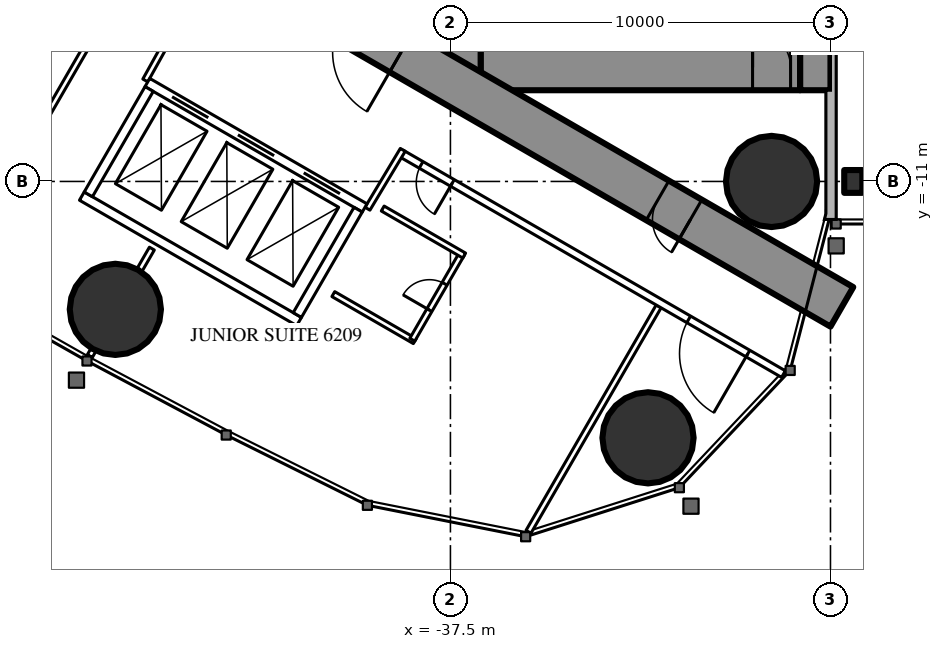
"""IFC4 building model, lengths in metres.
Left out: names, types, materials, properties, quantities, classifications, styles, units other than length and angle.
Written with IfcOpenShell. Run it as: python <this file> out.ifc"""

import sys

from ifc_helpers import new_model, si_unit, direction, frame, frame_2d, origin, origin_2d, place, context, subcontext, project, spatial, rectangle, circle, i_section, extrude, element, fill, save


model = new_model("IFC4")
c1 = context("Model", 3, precision=1e-05, world=origin(), true_north=direction((0.0, 1.0)))
c2 = subcontext(c1, "Body", "Model", "MODEL_VIEW")
j1 = project(units=[si_unit("LENGTHUNIT", "METRE"), si_unit("PLANEANGLEUNIT", "RADIAN")], contexts=[c1])
p1 = place(None, origin())
s1 = spatial("IfcSite", under=j1, at=p1, CompositionType="ELEMENT")
p2 = place(p1, origin())
s2 = spatial("IfcBuilding", under=s1, at=p2, CompositionType="ELEMENT")
p3 = place(p2, frame((0.0, 0.0, 233.3)))
s3 = spatial("IfcBuildingStorey", under=s2, at=p3, CompositionType="ELEMENT", Elevation=233.3)
for number, where, z_axis, x_axis in (
    (1, (-32.301, -17.745, 0.0), (0.0, 0.0, 1.0), (1.0, 0.0, 0.0)),
    (2, (-29.05, -11.0, 0.0), (0.0, 0.0, 1.0), (1.0, 0.0, 0.0)),
    (3, (-46.317, -14.365, 0.0), (0.0, 0.0, 1.0), (1.0, 0.0, 0.0)),
):
    element("IfcColumn", number, at=place(p3, frame(where, z_axis=z_axis, x_axis=x_axis)), inside=s3, PredefinedType="COLUMN", context=c2, shape_type="SweptSolid", body=[
        extrude(circle(Radius=1.2, at=origin_2d()), origin(), (0.0, 0.0, 1.0), 3.6),
    ])
p4 = place(p3, frame((-27.9, 8.6, 0.0), z_axis=(0.0, 0.0, 1.0), x_axis=(0.0, -1.0, 0.0)))
e4 = element("IfcWall", 4, at=p4, inside=s3, PredefinedType="SHEAR", context=c2, shape_type="SweptSolid", body=[
    extrude(rectangle(XDim=17.2, YDim=0.8, at=frame_2d((8.6, 0.0))), origin(), (0.0, 0.0, 1.0), 3.6),
])
p5 = place(p4, frame((6.95, 0.0, 0.0)))
e5 = element("IfcOpeningElement", 5, at=p5, cuts=e4, PredefinedType="OPENING", context=c2, shape_type="SweptSolid", body=[
    extrude(rectangle(XDim=0.9, YDim=2.2, at=frame_2d((0.45, 1.1))), frame((0.0, 0.41, 0.0), z_axis=(0.0, -1.0, 0.0), x_axis=(1.0, 0.0, 0.0)), (0.0, 0.0, 1.0), 0.82),
])
p6 = place(p3, frame((-37.3, 8.6, 0.0), z_axis=(0.0, 0.0, 1.0), x_axis=(0.0, -1.0, 0.0)))
e6 = element("IfcWall", 6, at=p6, inside=s3, PredefinedType="SHEAR", context=c2, shape_type="SweptSolid", body=[
    extrude(rectangle(XDim=17.2, YDim=1.2, at=frame_2d((8.6, 0.0))), origin(), (0.0, 0.0, 1.0), 3.6),
])
p7 = place(p6, frame((7.7, 0.0, 0.0)))
e7 = element("IfcOpeningElement", 7, at=p7, cuts=e6, PredefinedType="OPENING", context=c2, shape_type="SweptSolid", body=[
    extrude(rectangle(XDim=1.8, YDim=2.2, at=frame_2d((0.9, 1.1))), frame((0.0, 0.61, 0.0), z_axis=(0.0, -1.0, 0.0), x_axis=(1.0, 0.0, 0.0)), (0.0, 0.0, 1.0), 1.22),
])
p8 = place(p3, frame((-28.3, -8.0, 0.0), z_axis=(0.0, 0.0, 1.0), x_axis=(-1.0, 0.0, 0.0)))
e8 = element("IfcWall", 8, at=p8, inside=s3, PredefinedType="SHEAR", context=c2, shape_type="SweptSolid", body=[
    extrude(rectangle(XDim=8.4, YDim=1.2, at=frame_2d((4.2, 0.0))), origin(), (0.0, 0.0, 1.0), 3.6),
])
p9 = place(p8, frame((0.25, 0.0, 0.0)))
e9 = element("IfcOpeningElement", 9, at=p9, cuts=e8, PredefinedType="OPENING", context=c2, shape_type="SweptSolid", body=[
    extrude(rectangle(XDim=1.0, YDim=2.2, at=frame_2d((0.5, 1.1))), frame((0.0, 0.61, 0.0), z_axis=(0.0, -1.0, 0.0), x_axis=(1.0, 0.0, 0.0)), (0.0, 0.0, 1.0), 1.22),
])
p10 = place(p3, frame((-27.2, -14.3, 0.0), z_axis=(0.0, 0.0, 1.0), x_axis=(-0.866024021859, 0.500002393557, 0.0)))
e10 = element("IfcWall", 10, at=p10, inside=s3, PredefinedType="SHEAR", context=c2, shape_type="SweptSolid", body=[
    extrude(rectangle(XDim=27.907, YDim=1.2, at=frame_2d((13.954, 0.0))), origin(), (0.0, 0.0, 1.0), 3.6),
])
p11 = place(p10, frame((4.6, 0.0, 0.0)))
e11 = element("IfcOpeningElement", 11, at=p11, cuts=e10, PredefinedType="OPENING", context=c2, shape_type="SweptSolid", body=[
    extrude(rectangle(XDim=1.0, YDim=2.2, at=frame_2d((0.5, 1.1))), frame((0.0, 0.61, 0.0), z_axis=(0.0, -1.0, 0.0), x_axis=(1.0, 0.0, 0.0)), (0.0, 0.0, 1.0), 1.22),
])
p12 = place(p10, frame((13.395, 0.0, 0.0)))
e12 = element("IfcOpeningElement", 12, at=p12, cuts=e10, PredefinedType="OPENING", context=c2, shape_type="SweptSolid", body=[
    extrude(rectangle(XDim=1.8, YDim=2.2, at=frame_2d((0.9, 1.1))), frame((0.0, 0.61, 0.0), z_axis=(0.0, -1.0, 0.0), x_axis=(1.0, 0.0, 0.0)), (0.0, 0.0, 1.0), 1.22),
])
p13 = place(p3, frame((-26.9, -11.0, 0.0), z_axis=(0.0, 0.0, 1.0), x_axis=(1.0, 0.0, 0.0)))
e13 = element("IfcColumn", 13, at=p13, inside=s3, PredefinedType="COLUMN", context=c2, shape_type="SweptSolid", body=[
    extrude(i_section(OverallWidth=0.476, OverallDepth=0.6, WebThickness=0.1, FlangeThickness=0.14, FilletRadius=0.02, at=origin_2d()), origin(), (0.0, 0.0, 1.0), 3.6),
])
p14 = place(p3, frame((-32.022, -14.287, 0.0), z_axis=(0.0, 0.0, 1.0), x_axis=(-0.50000019414, -0.866025291697, 0.0)))
e14 = element("IfcWall", 14, at=p14, inside=s3, PredefinedType="PARTITIONING", context=c2, shape_type="SweptSolid", body=[
    extrude(rectangle(XDim=6.848, YDim=0.15, at=frame_2d((3.424, 0.0))), origin(), (0.0, 0.0, 1.0), 3.35),
])
p15 = place(p3, frame((-46.898, -15.439, 0.0), z_axis=(0.0, 0.0, 1.0), x_axis=(-0.500232303069, -0.865891241997, 0.0)))
e15 = element("IfcWall", 15, at=p15, inside=s3, PredefinedType="PARTITIONING", context=c2, shape_type="SweptSolid", body=[
    extrude(rectangle(XDim=0.18, YDim=0.15, at=frame_2d((0.09, 0.0))), origin(), (0.0, 0.0, 1.0), 2.45),
])
p16 = place(p3, frame((-46.274, -6.059, 0.0), z_axis=(0.0, 0.0, 1.0), x_axis=(-0.500020471368, -0.866013584312, 0.0)))
e16 = element("IfcWall", 16, at=p16, inside=s3, PredefinedType="PARTITIONING", context=c2, shape_type="SweptSolid", body=[
    extrude(rectangle(XDim=6.028, YDim=0.15, at=frame_2d((3.014, 0.0))), origin(), (0.0, 0.0, 1.0), 2.45),
])
p17 = place(p3, frame((-45.356, -12.767, 0.0), z_axis=(0.0, 0.0, 1.0), x_axis=(-0.499886366516, -0.866091000168, 0.0)))
e17 = element("IfcWall", 17, at=p17, inside=s3, PredefinedType="PARTITIONING", context=c2, shape_type="SweptSolid", body=[
    extrude(rectangle(XDim=0.645, YDim=0.15, at=frame_2d((0.322, 0.0))), origin(), (0.0, 0.0, 1.0), 3.35),
])
p18 = place(p3, frame((-28.737, -16.068, 0.0), z_axis=(0.0, 0.0, 1.0), x_axis=(-0.866029399323, 0.49999307946, 0.0)))
e18 = element("IfcWall", 18, at=p18, inside=s3, PredefinedType="PARTITIONING", context=c2, shape_type="SweptSolid", body=[
    extrude(rectangle(XDim=11.61, YDim=0.2, at=frame_2d((5.805, 0.0))), origin(), (0.0, 0.0, 1.0), 3.35),
])
p19 = place(p18, frame((1.08, 0.0, 0.0)))
e19 = element("IfcOpeningElement", 19, at=p19, cuts=e18, PredefinedType="OPENING", context=c2, shape_type="SweptSolid", body=[
    extrude(rectangle(XDim=1.8, YDim=2.03, at=frame_2d((0.9, 1.015))), frame((0.0, 0.11, 0.0), z_axis=(0.0, -1.0, 0.0), x_axis=(1.0, 0.0, 0.0)), (0.0, 0.0, 1.0), 0.22),
])
p20 = place(p18, frame((10.06, 0.0, 0.0)))
e20 = element("IfcOpeningElement", 20, at=p20, cuts=e18, PredefinedType="OPENING", context=c2, shape_type="SweptSolid", body=[
    extrude(rectangle(XDim=0.95, YDim=2.2, at=frame_2d((0.475, 1.1))), frame((0.0, 0.11, 0.0), z_axis=(0.0, -1.0, 0.0), x_axis=(1.0, 0.0, 0.0)), (0.0, 0.0, 1.0), 0.22),
])
for number, where, z_axis, x_axis in (
    (21, (-39.683, -11.718, 0.0), (0.0, 0.0, 1.0), (0.514, 0.858, 0.0)),
    (22, (-44.652, -6.764, 0.0), (0.0, 0.0, 1.0), (-0.485, -0.874, 0.0)),
):
    element("IfcWall", number, at=place(p3, frame(where, z_axis=z_axis, x_axis=x_axis)), inside=s3, PredefinedType="PARTITIONING", context=c2, shape_type="SweptSolid", body=[
        extrude(rectangle(XDim=1.805, YDim=0.15, at=frame_2d((0.903, 0.0))), origin(), (0.0, 0.0, 1.0), 3.35),
    ])
p21 = place(p3, frame((-38.438, -15.202, 0.0), z_axis=(0.0, 0.0, 1.0), x_axis=(-0.866073894602, 0.499916002032, 0.0)))
e23 = element("IfcWall", 23, at=p21, inside=s3, PredefinedType="PARTITIONING", context=c2, shape_type="SweptSolid", body=[
    extrude(rectangle(XDim=2.475, YDim=0.15, at=frame_2d((1.238, 0.0))), origin(), (0.0, 0.0, 1.0), 3.35),
])
p22 = place(p3, frame((-37.203, -12.913, 0.0), z_axis=(0.0, 0.0, 1.0), x_axis=(-0.500006934395, -0.866021400173, 0.0)))
e24 = element("IfcWall", 24, at=p22, inside=s3, PredefinedType="PARTITIONING", context=c2, shape_type="SweptSolid", body=[
    extrude(rectangle(XDim=2.6, YDim=0.15, at=frame_2d((1.3, 0.0))), origin(), (0.0, 0.0, 1.0), 3.35),
])
p23 = place(p22, frame((0.9, 0.0, 0.0)))
e25 = element("IfcOpeningElement", 25, at=p23, cuts=e24, PredefinedType="OPENING", context=c2, shape_type="SweptSolid", body=[
    extrude(rectangle(XDim=0.8, YDim=2.2, at=frame_2d((0.4, 1.1))), frame((0.0, 0.085, 0.0), z_axis=(0.0, -1.0, 0.0), x_axis=(1.0, 0.0, 0.0)), (0.0, 0.0, 1.0), 0.17),
])
p24 = place(p3, frame((-37.138, -12.95, 0.0), z_axis=(0.0, 0.0, 1.0), x_axis=(-0.866031185235, 0.4999899861, 0.0)))
e26 = element("IfcWall", 26, at=p24, inside=s3, PredefinedType="PARTITIONING", context=c2, shape_type="SweptSolid", body=[
    extrude(rectangle(XDim=2.475, YDim=0.15, at=frame_2d((1.238, 0.0))), origin(), (0.0, 0.0, 1.0), 2.5),
])
p25 = place(p3, frame((-39.758, -11.697, 0.0), z_axis=(0.0, 0.0, 1.0), x_axis=(-0.866024194504, 0.500002094529, 0.0)))
e27 = element("IfcWall", 27, at=p25, inside=s3, PredefinedType="PARTITIONING", context=c2, shape_type="SweptSolid", body=[
    extrude(rectangle(XDim=6.6, YDim=0.25, at=frame_2d((3.3, 0.0))), origin(), (0.0, 0.0, 1.0), 3.35),
])
p26 = place(p25, frame((0.75, 0.0, 0.0)))
e28 = element("IfcOpeningElement", 28, at=p26, cuts=e27, PredefinedType="OPENING", context=c2, shape_type="SweptSolid", body=[
    extrude(rectangle(XDim=1.1, YDim=2.2, at=frame_2d((0.55, 1.1))), frame((0.0, 0.135, 0.0), z_axis=(0.0, -1.0, 0.0), x_axis=(1.0, 0.0, 0.0)), (0.0, 0.0, 1.0), 0.27),
])
p27 = place(p25, frame((2.75, 0.0, 0.0)))
e29 = element("IfcOpeningElement", 29, at=p27, cuts=e27, PredefinedType="OPENING", context=c2, shape_type="SweptSolid", body=[
    extrude(rectangle(XDim=1.1, YDim=2.2, at=frame_2d((0.55, 1.1))), frame((0.0, 0.135, 0.0), z_axis=(0.0, -1.0, 0.0), x_axis=(1.0, 0.0, 0.0)), (0.0, 0.0, 1.0), 0.27),
])
p28 = place(p25, frame((4.75, 0.0, 0.0)))
e30 = element("IfcOpeningElement", 30, at=p28, cuts=e27, PredefinedType="OPENING", context=c2, shape_type="SweptSolid", body=[
    extrude(rectangle(XDim=1.1, YDim=2.2, at=frame_2d((0.55, 1.1))), frame((0.0, 0.135, 0.0), z_axis=(0.0, -1.0, 0.0), x_axis=(1.0, 0.0, 0.0)), (0.0, 0.0, 1.0), 0.27),
])
p29 = place(p3, frame((-41.482, -14.686, 0.0), z_axis=(0.0, 0.0, 1.0), x_axis=(-0.86603344179, 0.499986077507, 0.0)))
e31 = element("IfcWall", 31, at=p29, inside=s3, PredefinedType="PARTITIONING", context=c2, shape_type="SweptSolid", body=[
    extrude(rectangle(XDim=6.6, YDim=0.25, at=frame_2d((3.3, 0.0))), origin(), (0.0, 0.0, 1.0), 3.35),
])
for number, where, z_axis, x_axis in (
    (32, (-39.928, -11.743, 0.0), (0.0, 0.0, 1.0), (-0.5, -0.866, 0.0)),
    (33, (-45.428, -8.568, 0.0), (0.0, 0.0, 1.0), (-0.5, -0.866, 0.0)),
):
    element("IfcWall", number, at=place(p3, frame(where, z_axis=z_axis, x_axis=x_axis)), inside=s3, PredefinedType="PARTITIONING", context=c2, shape_type="SweptSolid", body=[
        extrude(rectangle(XDim=3.201, YDim=0.25, at=frame_2d((1.6, 0.0))), origin(), (0.0, 0.0, 1.0), 3.35),
    ])
p30 = place(p19, origin())
e34 = element("IfcDoor", 34, at=p30, inside=s3, OperationType="DOUBLE_DOOR_SINGLE_SWING", PredefinedType="DOOR", context=c2, shape_type="SweptSolid", body=[
    extrude(rectangle(XDim=1.8, YDim=2.03, at=frame_2d((0.9, 1.015))), frame((0.0, 0.025, 0.0), z_axis=(0.0, -1.0, 0.0), x_axis=(1.0, 0.0, 0.0)), (0.0, 0.0, 1.0), 0.05),
])
fill(e19, e34)
p31 = place(p23, origin())
e35 = element("IfcDoor", 35, at=p31, inside=s3, OperationType="SINGLE_SWING_RIGHT", PredefinedType="DOOR", context=c2, shape_type="SweptSolid", body=[
    extrude(rectangle(XDim=0.8, YDim=2.2, at=frame_2d((0.4, 1.1))), frame((0.0, 0.025, 0.0), z_axis=(0.0, -1.0, 0.0), x_axis=(1.0, 0.0, 0.0)), (0.0, 0.0, 1.0), 0.05),
])
fill(e25, e35)
p32 = place(p20, origin())
e36 = element("IfcDoor", 36, at=p32, inside=s3, OperationType="SINGLE_SWING_LEFT", PredefinedType="DOOR", context=c2, shape_type="SweptSolid", body=[
    extrude(rectangle(XDim=0.95, YDim=2.2, at=frame_2d((0.475, 1.1))), frame((0.0, 0.025, 0.0), z_axis=(0.0, -1.0, 0.0), x_axis=(1.0, 0.0, 0.0)), (0.0, 0.0, 1.0), 0.05),
])
fill(e20, e36)
p33 = place(p11, origin())
e37 = element("IfcDoor", 37, at=p33, inside=s3, OperationType="SINGLE_SWING_LEFT", PredefinedType="DOOR", context=c2, shape_type="SweptSolid", body=[
    extrude(rectangle(XDim=1.0, YDim=2.2, at=frame_2d((0.5, 1.1))), frame((0.0, 0.025, 0.0), z_axis=(0.0, -1.0, 0.0), x_axis=(1.0, 0.0, 0.0)), (0.0, 0.0, 1.0), 0.05),
])
fill(e11, e37)
p34 = place(p12, origin())
e38 = element("IfcDoor", 38, at=p34, inside=s3, OperationType="DOUBLE_DOOR_SINGLE_SWING", PredefinedType="DOOR", context=c2, shape_type="SweptSolid", body=[
    extrude(rectangle(XDim=1.8, YDim=2.2, at=frame_2d((0.9, 1.1))), frame((0.0, 0.025, 0.0), z_axis=(0.0, -1.0, 0.0), x_axis=(1.0, 0.0, 0.0)), (0.0, 0.0, 1.0), 0.05),
])
fill(e12, e38)
p35 = place(p9, origin())
e39 = element("IfcDoor", 39, at=p35, inside=s3, OperationType="SINGLE_SWING_RIGHT", PredefinedType="DOOR", context=c2, shape_type="SweptSolid", body=[
    extrude(rectangle(XDim=1.0, YDim=2.2, at=frame_2d((0.5, 1.1))), frame((0.0, 0.025, 0.0), z_axis=(0.0, -1.0, 0.0), x_axis=(1.0, 0.0, 0.0)), (0.0, 0.0, 1.0), 0.05),
])
fill(e9, e39)
p36 = place(p26, origin())
e40 = element("IfcDoor", 40, at=p36, inside=s3, OperationType="DOUBLE_DOOR_SLIDING", PredefinedType="USERDEFINED", context=c2, shape_type="SweptSolid", body=[
    extrude(rectangle(XDim=1.1, YDim=2.2, at=frame_2d((0.55, 1.1))), frame((0.0, 0.025, 0.0), z_axis=(0.0, -1.0, 0.0), x_axis=(1.0, 0.0, 0.0)), (0.0, 0.0, 1.0), 0.05),
])
fill(e28, e40)
p37 = place(p27, origin())
e41 = element("IfcDoor", 41, at=p37, inside=s3, OperationType="DOUBLE_DOOR_SLIDING", PredefinedType="USERDEFINED", context=c2, shape_type="SweptSolid", body=[
    extrude(rectangle(XDim=1.1, YDim=2.2, at=frame_2d((0.55, 1.1))), frame((0.0, 0.025, 0.0), z_axis=(0.0, -1.0, 0.0), x_axis=(1.0, 0.0, 0.0)), (0.0, 0.0, 1.0), 0.05),
])
fill(e29, e41)
p38 = place(p28, origin())
e42 = element("IfcDoor", 42, at=p38, inside=s3, OperationType="DOUBLE_DOOR_SLIDING", PredefinedType="USERDEFINED", context=c2, shape_type="SweptSolid", body=[
    extrude(rectangle(XDim=1.1, YDim=2.2, at=frame_2d((0.55, 1.1))), frame((0.0, 0.025, 0.0), z_axis=(0.0, -1.0, 0.0), x_axis=(1.0, 0.0, 0.0)), (0.0, 0.0, 1.0), 0.05),
])
fill(e30, e42)
save(model, sys.argv[1])
